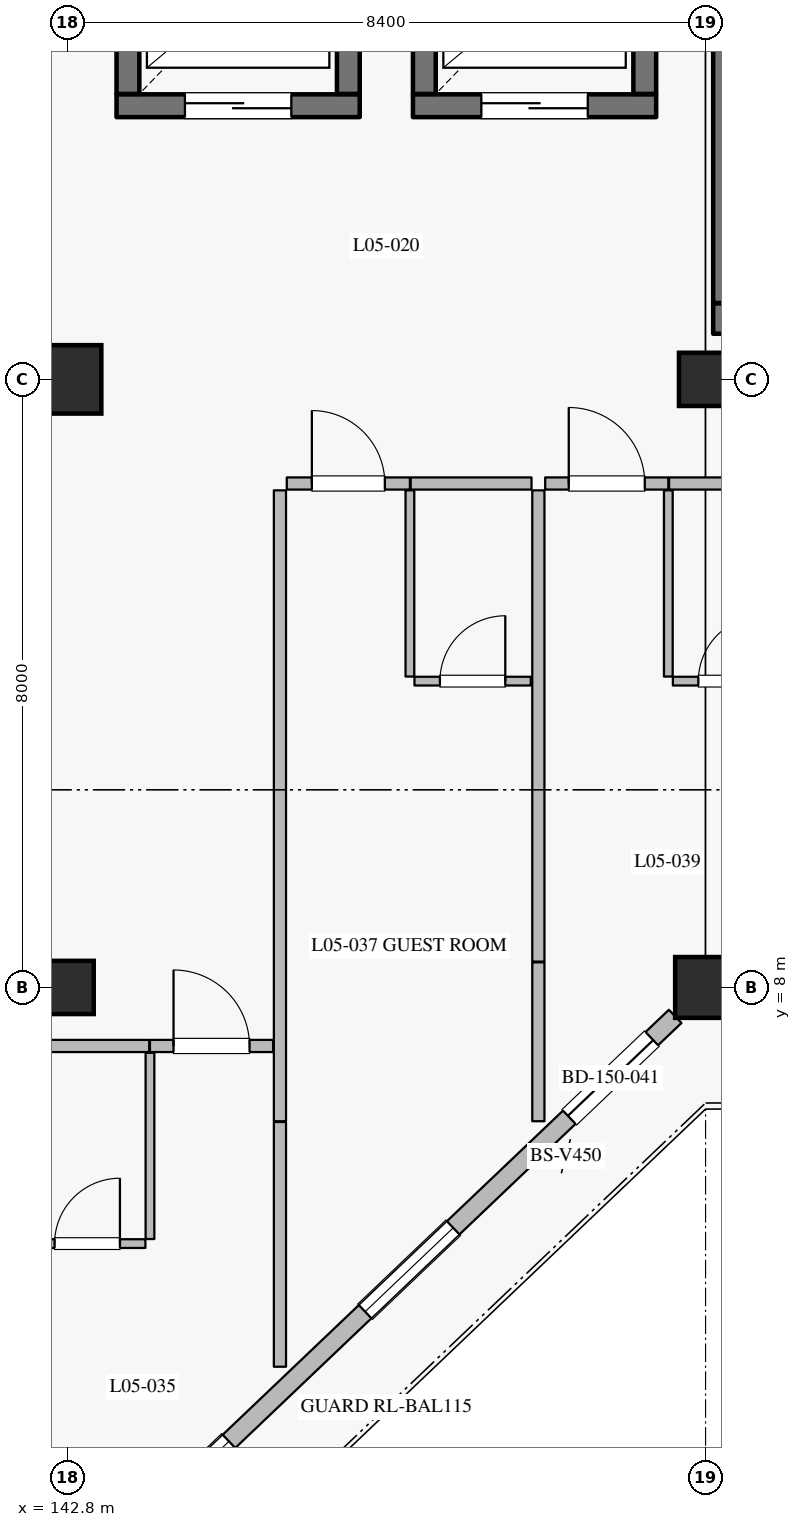
"""IFC4 building model, lengths in metres.
Left out: names, types, materials, properties, quantities, classifications, styles, units other than length and angle.
Written with IfcOpenShell. Run it as: python <this file> out.ifc"""

import sys

from ifc_helpers import new_model, si_unit, direction, frame, frame_2d, origin, origin_2d, place, context, subcontext, project, spatial, rectangle, extrude, element, fill, save


model = new_model("IFC4")
c1 = context("Model", 3, precision=1e-05, world=origin(), true_north=direction((0.0, 1.0)))
c2 = subcontext(c1, "Body", "Model", "MODEL_VIEW")
j1 = project(units=[si_unit("LENGTHUNIT", "METRE"), si_unit("PLANEANGLEUNIT", "RADIAN")], contexts=[c1])
p1 = place(None, origin())
s1 = spatial("IfcSite", under=j1, at=p1, CompositionType="ELEMENT")
p2 = place(p1, origin())
s2 = spatial("IfcBuilding", under=s1, at=p2, CompositionType="ELEMENT")
p3 = place(p2, frame((0.0, 0.0, 25.2)))
s3 = spatial("IfcBuildingStorey", under=s2, at=p3, CompositionType="ELEMENT", Elevation=25.2)
p4 = place(p3, frame((142.8, 16.0, 0.0), z_axis=(0.0, 0.0, 1.0), x_axis=(1.0, 0.0, 0.0)))
e1 = element("IfcColumn", 1, at=p4, inside=s3, PredefinedType="COLUMN", context=c2, shape_type="SweptSolid", body=[
    extrude(rectangle(XDim=0.9, YDim=0.9, at=origin_2d()), origin(), (0.0, 0.0, 1.0), 3.6),
])
p5 = place(p3, frame((151.2, 8.0, 0.0), z_axis=(0.0, 0.0, 1.0), x_axis=(1.0, 0.0, 0.0)))
e2 = element("IfcColumn", 2, at=p5, inside=s3, PredefinedType="COLUMN", context=c2, shape_type="SweptSolid", body=[
    extrude(rectangle(XDim=0.8, YDim=0.8, at=origin_2d()), origin(), (0.0, 0.0, 1.0), 3.6),
])
for number, where, z_axis, x_axis in (
    (3, (142.8, 8.0, 0.0), (0.0, 0.0, 1.0), (1.0, 0.0, 0.0)),
    (4, (151.2, 16.0, 0.0), (0.0, 0.0, 1.0), (1.0, 0.0, 0.0)),
):
    element("IfcColumn", number, at=place(p3, frame(where, z_axis=z_axis, x_axis=x_axis)), inside=s3, PredefinedType="COLUMN", context=c2, shape_type="SweptSolid", body=[
        extrude(rectangle(XDim=0.7, YDim=0.7, at=origin_2d()), origin(), (0.0, 0.0, 1.0), 3.6),
    ])
p6 = place(p3, frame((150.8, 7.619, 0.0), z_axis=(0.0, 0.0, 1.0), x_axis=(-0.724156739794, -0.689635422677, 0.0)))
e5 = element("IfcWall", 5, at=p6, inside=s3, PredefinedType="SOLIDWALL", context=c2, shape_type="SweptSolid", body=[
    extrude(rectangle(XDim=10.495, YDim=0.24, at=frame_2d((5.248, 0.0))), origin(), (0.0, 0.0, 1.0), 2.93),
])
p7 = place(p6, frame((0.424, 0.0, 0.0)))
e6 = element("IfcOpeningElement", 6, at=p7, cuts=e5, PredefinedType="OPENING", context=c2, shape_type="SweptSolid", body=[
    extrude(rectangle(XDim=1.5, YDim=2.25, at=frame_2d((0.75, 1.125))), frame((0.0, 0.13, 0.0), z_axis=(0.0, -1.0, 0.0), x_axis=(1.0, 0.0, 0.0)), (0.0, 0.0, 1.0), 0.26),
])
p8 = place(p6, frame((4.033, 0.0, 0.8)))
e7 = element("IfcOpeningElement", 7, at=p8, cuts=e5, PredefinedType="OPENING", context=c2, shape_type="SweptSolid", body=[
    extrude(rectangle(XDim=1.6, YDim=1.6, at=frame_2d((0.8, 0.8))), frame((0.0, 0.13, 0.0), z_axis=(0.0, -1.0, 0.0), x_axis=(1.0, 0.0, 0.0)), (0.0, 0.0, 1.0), 0.26),
])
p9 = place(p6, frame((8.107, 0.0, 0.8)))
e8 = element("IfcOpeningElement", 8, at=p9, cuts=e5, PredefinedType="OPENING", context=c2, shape_type="SweptSolid", body=[
    extrude(rectangle(XDim=1.6, YDim=1.6, at=frame_2d((0.8, 0.8))), frame((0.0, 0.13, 0.0), z_axis=(0.0, -1.0, 0.0), x_axis=(1.0, 0.0, 0.0)), (0.0, 0.0, 1.0), 0.26),
])
p10 = place(p3, frame((143.45, 19.6, 0.0), z_axis=(0.0, 0.0, 1.0), x_axis=(1.0, 0.0, 0.0)))
e9 = element("IfcWall", 9, at=p10, inside=s3, PredefinedType="SHEAR", context=c2, shape_type="SweptSolid", body=[
    extrude(rectangle(XDim=3.2, YDim=0.3, at=frame_2d((1.6, 0.0))), origin(), (0.0, 0.0, 1.0), 3.335),
])
p11 = place(p10, frame((0.9, 0.0, 0.0)))
e10 = element("IfcOpeningElement", 10, at=p11, cuts=e9, PredefinedType="OPENING", context=c2, shape_type="SweptSolid", body=[
    extrude(rectangle(XDim=1.4, YDim=2.35, at=frame_2d((0.7, 1.175))), frame((0.0, 0.16, 0.0), z_axis=(0.0, -1.0, 0.0), x_axis=(1.0, 0.0, 0.0)), (0.0, 0.0, 1.0), 0.32),
])
for number, where, z_axis, x_axis in (
    (11, (146.5, 19.755, 0.0), (0.0, 0.0, 1.0), (0.0, 1.0, 0.0)),
    (12, (143.6, 22.445, 0.0), (0.0, 0.0, 1.0), (0.0, -1.0, 0.0)),
):
    element("IfcWall", number, at=place(p3, frame(where, z_axis=z_axis, x_axis=x_axis)), inside=s3, PredefinedType="SHEAR", context=c2, shape_type="SweptSolid", body=[
        extrude(rectangle(XDim=2.69, YDim=0.3, at=frame_2d((1.345, 0.0))), origin(), (0.0, 0.0, 1.0), 3.335),
    ])
p12 = place(p3, frame((147.35, 19.6, 0.0), z_axis=(0.0, 0.0, 1.0), x_axis=(1.0, 0.0, 0.0)))
e13 = element("IfcWall", 13, at=p12, inside=s3, PredefinedType="SHEAR", context=c2, shape_type="SweptSolid", body=[
    extrude(rectangle(XDim=3.2, YDim=0.3, at=frame_2d((1.6, 0.0))), origin(), (0.0, 0.0, 1.0), 3.335),
])
p13 = place(p12, frame((0.9, 0.0, 0.0)))
e14 = element("IfcOpeningElement", 14, at=p13, cuts=e13, PredefinedType="OPENING", context=c2, shape_type="SweptSolid", body=[
    extrude(rectangle(XDim=1.4, YDim=2.35, at=frame_2d((0.7, 1.175))), frame((0.0, 0.16, 0.0), z_axis=(0.0, -1.0, 0.0), x_axis=(1.0, 0.0, 0.0)), (0.0, 0.0, 1.0), 0.32),
])
for number, where, z_axis, x_axis in (
    (15, (150.4, 19.755, 0.0), (0.0, 0.0, 1.0), (0.0, 1.0, 0.0)),
    (16, (147.5, 22.445, 0.0), (0.0, 0.0, 1.0), (0.0, -1.0, 0.0)),
):
    element("IfcWall", number, at=place(p3, frame(where, z_axis=z_axis, x_axis=x_axis)), inside=s3, PredefinedType="SHEAR", context=c2, shape_type="SweptSolid", body=[
        extrude(rectangle(XDim=2.69, YDim=0.3, at=frame_2d((1.345, 0.0))), origin(), (0.0, 0.0, 1.0), 3.335),
    ])
p14 = place(p3, frame((151.3, 16.8, 0.0), z_axis=(0.0, 0.0, 1.0), x_axis=(1.0, 0.0, 0.0)))
e17 = element("IfcWall", 17, at=p14, inside=s3, PredefinedType="SHEAR", context=c2, shape_type="SweptSolid", body=[
    extrude(rectangle(XDim=8.2, YDim=0.4, at=frame_2d((4.1, 0.0))), origin(), (0.0, 0.0, 1.0), 3.335),
])
p15 = place(p3, frame((151.5, 17.005, 0.0), z_axis=(0.0, 0.0, 1.0), x_axis=(0.0, 1.0, 0.0)))
e18 = element("IfcWall", 18, at=p15, inside=s3, PredefinedType="SHEAR", context=c2, shape_type="SweptSolid", body=[
    extrude(rectangle(XDim=3.95, YDim=0.4, at=frame_2d((1.975, 0.0))), origin(), (0.0, 0.0, 1.0), 3.335),
])
p16 = place(p3, frame((142.29, 7.23, 0.0), z_axis=(0.0, 0.0, 1.0), x_axis=(1.0, 0.0, 0.0)))
e19 = element("IfcWall", 19, at=p16, inside=s3, PredefinedType="PARTITIONING", context=c2, shape_type="SweptSolid", body=[
    extrude(rectangle(XDim=1.59, YDim=0.16, at=frame_2d((0.795, 0.0))), origin(), (0.0, 0.0, 1.0), 3.335),
])
p17 = place(p3, frame((143.89, 7.23, 0.0), z_axis=(0.0, 0.0, 1.0), x_axis=(1.0, 0.0, 0.0)))
e20 = element("IfcWall", 20, at=p17, inside=s3, PredefinedType="PARTITIONING", context=c2, shape_type="SweptSolid", body=[
    extrude(rectangle(XDim=1.62, YDim=0.16, at=frame_2d((0.81, 0.0))), origin(), (0.0, 0.0, 1.0), 3.335),
])
p18 = place(p17, frame((0.31, 0.0, 0.0)))
e21 = element("IfcOpeningElement", 21, at=p18, cuts=e20, PredefinedType="OPENING", context=c2, shape_type="SweptSolid", body=[
    extrude(rectangle(XDim=1.0, YDim=2.25, at=frame_2d((0.5, 1.125))), frame((0.0, 0.09, 0.0), z_axis=(0.0, -1.0, 0.0), x_axis=(1.0, 0.0, 0.0)), (0.0, 0.0, 1.0), 0.18),
])
p19 = place(p3, frame((143.89, 4.69, 0.0), z_axis=(0.0, 0.0, 1.0), x_axis=(0.0, 1.0, 0.0)))
e22 = element("IfcWall", 22, at=p19, inside=s3, PredefinedType="PARTITIONING", context=c2, shape_type="SweptSolid", body=[
    extrude(rectangle(XDim=2.45, YDim=0.115, at=frame_2d((1.225, 0.0))), origin(), (0.0, 0.0, 1.0), 3.335),
])
p20 = place(p3, frame((142.3, 4.63, 0.0), z_axis=(0.0, 0.0, 1.0), x_axis=(1.0, 0.0, 0.0)))
e23 = element("IfcWall", 23, at=p20, inside=s3, PredefinedType="PARTITIONING", context=c2, shape_type="SweptSolid", body=[
    extrude(rectangle(XDim=1.53, YDim=0.115, at=frame_2d((0.765, 0.0))), origin(), (0.0, 0.0, 1.0), 3.335),
])
p21 = place(p20, frame((0.335, 0.0, 0.0)))
e24 = element("IfcOpeningElement", 24, at=p21, cuts=e23, PredefinedType="OPENING", context=c2, shape_type="SweptSolid", body=[
    extrude(rectangle(XDim=0.86, YDim=2.12, at=frame_2d((0.43, 1.06))), frame((0.0, 0.067, 0.0), z_axis=(0.0, -1.0, 0.0), x_axis=(1.0, 0.0, 0.0)), (0.0, 0.0, 1.0), 0.135),
])
p22 = place(p3, frame((145.6, 3.01, 0.0), z_axis=(0.0, 0.0, 1.0), x_axis=(0.0, 1.0, 0.0)))
e25 = element("IfcWall", 25, at=p22, inside=s3, PredefinedType="PARTITIONING", context=c2, shape_type="SweptSolid", body=[
    extrude(rectangle(XDim=3.22, YDim=0.16, at=frame_2d((1.61, 0.0))), origin(), (0.0, 0.0, 1.0), 3.335),
])
p23 = place(p3, frame((145.69, 14.63, 0.0), z_axis=(0.0, 0.0, 1.0), x_axis=(1.0, 0.0, 0.0)))
e26 = element("IfcWall", 26, at=p23, inside=s3, PredefinedType="PARTITIONING", context=c2, shape_type="SweptSolid", body=[
    extrude(rectangle(XDim=1.62, YDim=0.16, at=frame_2d((0.81, 0.0))), origin(), (0.0, 0.0, 1.0), 3.335),
])
p24 = place(p23, frame((0.33, 0.0, 0.0)))
e27 = element("IfcOpeningElement", 27, at=p24, cuts=e26, PredefinedType="OPENING", context=c2, shape_type="SweptSolid", body=[
    extrude(rectangle(XDim=0.96, YDim=2.2, at=frame_2d((0.48, 1.1))), frame((0.0, 0.09, 0.0), z_axis=(0.0, -1.0, 0.0), x_axis=(1.0, 0.0, 0.0)), (0.0, 0.0, 1.0), 0.18),
])
p25 = place(p3, frame((147.32, 14.63, 0.0), z_axis=(0.0, 0.0, 1.0), x_axis=(1.0, 0.0, 0.0)))
e28 = element("IfcWall", 28, at=p25, inside=s3, PredefinedType="PARTITIONING", context=c2, shape_type="SweptSolid", body=[
    extrude(rectangle(XDim=1.59, YDim=0.16, at=frame_2d((0.795, 0.0))), origin(), (0.0, 0.0, 1.0), 3.335),
])
p26 = place(p3, frame((147.31, 12.09, 0.0), z_axis=(0.0, 0.0, 1.0), x_axis=(0.0, 1.0, 0.0)))
e29 = element("IfcWall", 29, at=p26, inside=s3, PredefinedType="PARTITIONING", context=c2, shape_type="SweptSolid", body=[
    extrude(rectangle(XDim=2.45, YDim=0.115, at=frame_2d((1.225, 0.0))), origin(), (0.0, 0.0, 1.0), 3.335),
])
p27 = place(p3, frame((147.37, 12.03, 0.0), z_axis=(0.0, 0.0, 1.0), x_axis=(1.0, 0.0, 0.0)))
e30 = element("IfcWall", 30, at=p27, inside=s3, PredefinedType="PARTITIONING", context=c2, shape_type="SweptSolid", body=[
    extrude(rectangle(XDim=1.53, YDim=0.115, at=frame_2d((0.765, 0.0))), origin(), (0.0, 0.0, 1.0), 3.335),
])
p28 = place(p27, frame((0.335, 0.0, 0.0)))
e31 = element("IfcOpeningElement", 31, at=p28, cuts=e30, PredefinedType="OPENING", context=c2, shape_type="SweptSolid", body=[
    extrude(rectangle(XDim=0.86, YDim=2.12, at=frame_2d((0.43, 1.06))), frame((0.0, 0.067, 0.0), z_axis=(0.0, -1.0, 0.0), x_axis=(1.0, 0.0, 0.0)), (0.0, 0.0, 1.0), 0.135),
])
p29 = place(p3, frame((145.6, 6.24, 0.0), z_axis=(0.0, 0.0, 1.0), x_axis=(0.0, 1.0, 0.0)))
e32 = element("IfcWall", 32, at=p29, inside=s3, PredefinedType="PARTITIONING", context=c2, shape_type="SweptSolid", body=[
    extrude(rectangle(XDim=8.3, YDim=0.16, at=frame_2d((4.15, 0.0))), origin(), (0.0, 0.0, 1.0), 3.335),
])
p30 = place(p3, frame((149.0, 6.24, 0.0), z_axis=(0.0, 0.0, 1.0), x_axis=(0.0, 1.0, 0.0)))
e33 = element("IfcWall", 33, at=p30, inside=s3, PredefinedType="PARTITIONING", context=c2, shape_type="SweptSolid", body=[
    extrude(rectangle(XDim=2.09, YDim=0.16, at=frame_2d((1.045, 0.0))), origin(), (0.0, 0.0, 1.0), 3.335),
])
p31 = place(p3, frame((149.09, 14.63, 0.0), z_axis=(0.0, 0.0, 1.0), x_axis=(1.0, 0.0, 0.0)))
e34 = element("IfcWall", 34, at=p31, inside=s3, PredefinedType="PARTITIONING", context=c2, shape_type="SweptSolid", body=[
    extrude(rectangle(XDim=1.62, YDim=0.16, at=frame_2d((0.81, 0.0))), origin(), (0.0, 0.0, 1.0), 3.335),
])
p32 = place(p31, frame((0.31, 0.0, 0.0)))
e35 = element("IfcOpeningElement", 35, at=p32, cuts=e34, PredefinedType="OPENING", context=c2, shape_type="SweptSolid", body=[
    extrude(rectangle(XDim=1.0, YDim=2.25, at=frame_2d((0.5, 1.125))), frame((0.0, 0.09, 0.0), z_axis=(0.0, -1.0, 0.0), x_axis=(1.0, 0.0, 0.0)), (0.0, 0.0, 1.0), 0.18),
])
p33 = place(p3, frame((150.72, 14.63, 0.0), z_axis=(0.0, 0.0, 1.0), x_axis=(1.0, 0.0, 0.0)))
e36 = element("IfcWall", 36, at=p33, inside=s3, PredefinedType="PARTITIONING", context=c2, shape_type="SweptSolid", body=[
    extrude(rectangle(XDim=1.59, YDim=0.16, at=frame_2d((0.795, 0.0))), origin(), (0.0, 0.0, 1.0), 3.335),
])
p34 = place(p3, frame((150.71, 12.09, 0.0), z_axis=(0.0, 0.0, 1.0), x_axis=(0.0, 1.0, 0.0)))
e37 = element("IfcWall", 37, at=p34, inside=s3, PredefinedType="PARTITIONING", context=c2, shape_type="SweptSolid", body=[
    extrude(rectangle(XDim=2.45, YDim=0.115, at=frame_2d((1.225, 0.0))), origin(), (0.0, 0.0, 1.0), 3.335),
])
p35 = place(p3, frame((150.77, 12.03, 0.0), z_axis=(0.0, 0.0, 1.0), x_axis=(1.0, 0.0, 0.0)))
e38 = element("IfcWall", 38, at=p35, inside=s3, PredefinedType="PARTITIONING", context=c2, shape_type="SweptSolid", body=[
    extrude(rectangle(XDim=1.53, YDim=0.115, at=frame_2d((0.765, 0.0))), origin(), (0.0, 0.0, 1.0), 3.335),
])
p36 = place(p35, frame((0.335, 0.0, 0.0)))
e39 = element("IfcOpeningElement", 39, at=p36, cuts=e38, PredefinedType="OPENING", context=c2, shape_type="SweptSolid", body=[
    extrude(rectangle(XDim=0.86, YDim=2.12, at=frame_2d((0.43, 1.06))), frame((0.0, 0.067, 0.0), z_axis=(0.0, -1.0, 0.0), x_axis=(1.0, 0.0, 0.0)), (0.0, 0.0, 1.0), 0.135),
])
p37 = place(p3, frame((149.0, 8.34, 0.0), z_axis=(0.0, 0.0, 1.0), x_axis=(0.0, 1.0, 0.0)))
e40 = element("IfcWall", 40, at=p37, inside=s3, PredefinedType="PARTITIONING", context=c2, shape_type="SweptSolid", body=[
    extrude(rectangle(XDim=6.2, YDim=0.16, at=frame_2d((3.1, 0.0))), origin(), (0.0, 0.0, 1.0), 3.335),
])
p38 = place(p7, origin())
e41 = element("IfcDoor", 41, at=p38, inside=s3, OperationType="SLIDING_TO_LEFT", PredefinedType="DOOR", context=c2, shape_type="SweptSolid", body=[
    extrude(rectangle(XDim=1.5, YDim=2.25, at=frame_2d((0.75, 1.125))), frame((0.0, 0.025, 0.0), z_axis=(0.0, -1.0, 0.0), x_axis=(1.0, 0.0, 0.0)), (0.0, 0.0, 1.0), 0.05),
])
fill(e6, e41)
p39 = place(p8, origin())
e42 = element("IfcWindow", 42, at=p39, inside=s3, PartitioningType="SINGLE_PANEL", PredefinedType="WINDOW", context=c2, shape_type="SweptSolid", body=[
    extrude(rectangle(XDim=1.6, YDim=1.6, at=frame_2d((0.8, 0.8))), frame((0.0, 0.03, 0.0), z_axis=(0.0, -1.0, 0.0), x_axis=(1.0, 0.0, 0.0)), (0.0, 0.0, 1.0), 0.06),
])
fill(e7, e42)
p40 = place(p9, origin())
e43 = element("IfcWindow", 43, at=p40, inside=s3, PartitioningType="SINGLE_PANEL", PredefinedType="WINDOW", context=c2, shape_type="SweptSolid", body=[
    extrude(rectangle(XDim=1.6, YDim=1.6, at=frame_2d((0.8, 0.8))), frame((0.0, 0.03, 0.0), z_axis=(0.0, -1.0, 0.0), x_axis=(1.0, 0.0, 0.0)), (0.0, 0.0, 1.0), 0.06),
])
fill(e8, e43)
p41 = place(p11, origin())
e44 = element("IfcDoor", 44, at=p41, inside=s3, OperationType="DOUBLE_DOOR_SLIDING", PredefinedType="DOOR", context=c2, shape_type="SweptSolid", body=[
    extrude(rectangle(XDim=1.4, YDim=2.35, at=frame_2d((0.7, 1.175))), frame((0.0, 0.025, 0.0), z_axis=(0.0, -1.0, 0.0), x_axis=(1.0, 0.0, 0.0)), (0.0, 0.0, 1.0), 0.05),
])
fill(e10, e44)
p42 = place(p13, origin())
e45 = element("IfcDoor", 45, at=p42, inside=s3, OperationType="DOUBLE_DOOR_SLIDING", PredefinedType="DOOR", context=c2, shape_type="SweptSolid", body=[
    extrude(rectangle(XDim=1.4, YDim=2.35, at=frame_2d((0.7, 1.175))), frame((0.0, 0.025, 0.0), z_axis=(0.0, -1.0, 0.0), x_axis=(1.0, 0.0, 0.0)), (0.0, 0.0, 1.0), 0.05),
])
fill(e14, e45)
p43 = place(p18, origin())
e46 = element("IfcDoor", 46, at=p43, inside=s3, OperationType="SINGLE_SWING_LEFT", PredefinedType="DOOR", context=c2, shape_type="SweptSolid", body=[
    extrude(rectangle(XDim=1.0, YDim=2.25, at=frame_2d((0.5, 1.125))), frame((0.0, 0.025, 0.0), z_axis=(0.0, -1.0, 0.0), x_axis=(1.0, 0.0, 0.0)), (0.0, 0.0, 1.0), 0.05),
])
fill(e21, e46)
p44 = place(p21, origin())
e47 = element("IfcDoor", 47, at=p44, inside=s3, OperationType="SINGLE_SWING_RIGHT", PredefinedType="DOOR", context=c2, shape_type="SweptSolid", body=[
    extrude(rectangle(XDim=0.86, YDim=2.12, at=frame_2d((0.43, 1.06))), frame((0.0, 0.025, 0.0), z_axis=(0.0, -1.0, 0.0), x_axis=(1.0, 0.0, 0.0)), (0.0, 0.0, 1.0), 0.05),
])
fill(e24, e47)
p45 = place(p24, origin())
e48 = element("IfcDoor", 48, at=p45, inside=s3, OperationType="SINGLE_SWING_LEFT", PredefinedType="DOOR", context=c2, shape_type="SweptSolid", body=[
    extrude(rectangle(XDim=0.96, YDim=2.2, at=frame_2d((0.48, 1.1))), frame((0.0, 0.025, 0.0), z_axis=(0.0, -1.0, 0.0), x_axis=(1.0, 0.0, 0.0)), (0.0, 0.0, 1.0), 0.05),
])
fill(e27, e48)
p46 = place(p28, origin())
e49 = element("IfcDoor", 49, at=p46, inside=s3, OperationType="SINGLE_SWING_RIGHT", PredefinedType="DOOR", context=c2, shape_type="SweptSolid", body=[
    extrude(rectangle(XDim=0.86, YDim=2.12, at=frame_2d((0.43, 1.06))), frame((0.0, 0.025, 0.0), z_axis=(0.0, -1.0, 0.0), x_axis=(1.0, 0.0, 0.0)), (0.0, 0.0, 1.0), 0.05),
])
fill(e31, e49)
p47 = place(p32, origin())
e50 = element("IfcDoor", 50, at=p47, inside=s3, OperationType="SINGLE_SWING_LEFT", PredefinedType="DOOR", context=c2, shape_type="SweptSolid", body=[
    extrude(rectangle(XDim=1.0, YDim=2.25, at=frame_2d((0.5, 1.125))), frame((0.0, 0.025, 0.0), z_axis=(0.0, -1.0, 0.0), x_axis=(1.0, 0.0, 0.0)), (0.0, 0.0, 1.0), 0.05),
])
fill(e35, e50)
p48 = place(p36, origin())
e51 = element("IfcDoor", 51, at=p48, inside=s3, OperationType="SINGLE_SWING_RIGHT", PredefinedType="DOOR", context=c2, shape_type="SweptSolid", body=[
    extrude(rectangle(XDim=0.86, YDim=2.12, at=frame_2d((0.43, 1.06))), frame((0.0, 0.025, 0.0), z_axis=(0.0, -1.0, 0.0), x_axis=(1.0, 0.0, 0.0)), (0.0, 0.0, 1.0), 0.05),
])
fill(e39, e51)
save(model, sys.argv[1])
